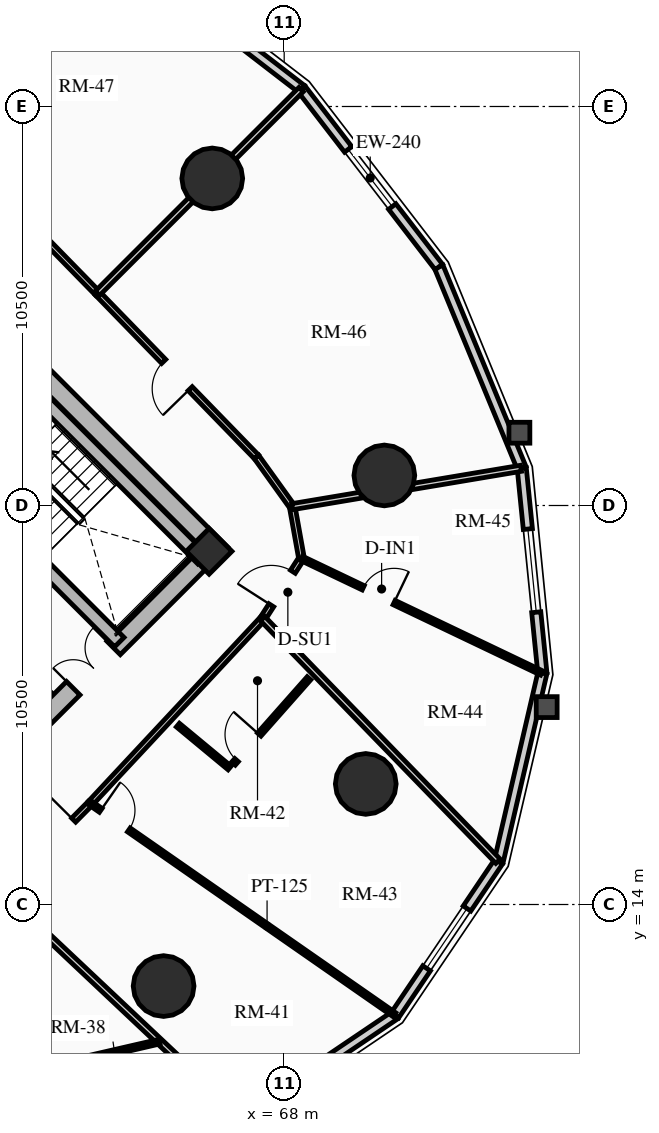
"""IFC4 building model, lengths in metres.
Left out: names, types, materials, properties, quantities, classifications, styles, units other than length and angle.
Written with IfcOpenShell. Run it as: python <this file> out.ifc"""

import sys

from ifc_helpers import new_model, si_unit, direction, frame, frame_2d, origin, origin_2d, place, context, subcontext, project, spatial, rectangle, circle, extrude, source, transform, mapped, element, fill, save


model = new_model("IFC4")
c1 = context("Model", 3, precision=1e-05, world=origin(), true_north=direction((0.0, 1.0)))
c2 = subcontext(c1, "Body", "Model", "MODEL_VIEW")
j1 = project(units=[si_unit("LENGTHUNIT", "METRE"), si_unit("PLANEANGLEUNIT", "RADIAN")], contexts=[c1])
p1 = place(None, origin())
s1 = spatial("IfcSite", under=j1, at=p1, CompositionType="ELEMENT")
p2 = place(p1, origin())
s2 = spatial("IfcBuilding", under=s1, at=p2, CompositionType="ELEMENT")
p3 = place(p2, frame((0.0, 0.0, 45.28)))
s3 = spatial("IfcBuildingStorey", under=s2, at=p3, CompositionType="ELEMENT", Elevation=45.28)
p4 = place(p3, frame((66.339, 23.227, 0.0), z_axis=(0.0, 0.0, 1.0), x_axis=(-0.707106781187, 0.707106781187, 0.0)))
e1 = element("IfcWall", 1, at=p4, inside=s3, PredefinedType="SHEAR", context=c2, shape_type="SweptSolid", body=[
    extrude(rectangle(XDim=14.3, YDim=0.5, at=frame_2d((7.15, 0.0))), origin(), (0.0, 0.0, 1.0), 2.91),
])
p5 = place(p3, frame((58.596, 15.838, 0.0), z_axis=(0.0, 0.0, 1.0), x_axis=(0.707106781187, 0.707106781187, 0.0)))
e2 = element("IfcWall", 2, at=p5, inside=s3, PredefinedType="SHEAR", context=c2, shape_type="SweptSolid", body=[
    extrude(rectangle(XDim=10.7, YDim=0.5, at=frame_2d((5.35, 0.0))), origin(), (0.0, 0.0, 1.0), 2.91),
])
m1 = source(origin(), c2, "Body", "SweptSolid", [
    extrude(rectangle(XDim=1.5, YDim=2.02, at=frame_2d((0.75, 1.01))), frame((0.0, 0.26, 0.0), z_axis=(0.0, -1.0, 0.0), x_axis=(1.0, 0.0, 0.0)), (0.0, 0.0, 1.0), 0.52),
])
p6 = place(p5, frame((5.45, 0.0, 0.0)))
e3 = element("IfcOpeningElement", 3, at=p6, cuts=e2, PredefinedType="OPENING", context=c2, shape_type="MappedRepresentation", body=[
    mapped(m1, transform((0.0, 0.0, 0.0), x_axis=(1.0, 0.0, 0.0), y_axis=(0.0, 1.0, 0.0), z_axis=(0.0, 0.0, 1.0), scale=1.0)),
])
p7 = place(p3, frame((63.662, 20.904, 0.0), z_axis=(0.0, 0.0, 1.0), x_axis=(-0.707106781187, 0.707106781187, 0.0)))
e4 = element("IfcWall", 4, at=p7, inside=s3, PredefinedType="SHEAR", context=c2, shape_type="SweptSolid", body=[
    extrude(rectangle(XDim=13.8, YDim=0.35, at=frame_2d((6.9, 0.0))), origin(), (0.0, 0.0, 1.0), 2.91),
])
m2 = source(origin(), c2, "Body", "SweptSolid", [
    extrude(rectangle(XDim=1.1, YDim=2.015, at=frame_2d((0.55, 1.007))), frame((0.0, 0.185, 0.0), z_axis=(0.0, -1.0, 0.0), x_axis=(1.0, 0.0, 0.0)), (0.0, 0.0, 1.0), 0.37),
])
p8 = place(p7, frame((10.025, 0.0, 0.0)))
e5 = element("IfcOpeningElement", 5, at=p8, cuts=e4, PredefinedType="OPENING", context=c2, shape_type="MappedRepresentation", body=[
    mapped(m2, transform((0.0, 0.0, 0.0), x_axis=(1.0, 0.0, 0.0), y_axis=(0.0, 1.0, 0.0), z_axis=(0.0, 0.0, 1.0), scale=1.0)),
])
p9 = place(p7, frame((12.025, 0.0, 0.0)))
e6 = element("IfcOpeningElement", 6, at=p9, cuts=e4, PredefinedType="OPENING", context=c2, shape_type="MappedRepresentation", body=[
    mapped(m2, transform((0.0, 0.0, 0.0), x_axis=(1.0, 0.0, 0.0), y_axis=(0.0, 1.0, 0.0), z_axis=(0.0, 0.0, 1.0), scale=1.0)),
])
m3 = source(origin(), c2, "Body", "SweptSolid", [
    extrude(rectangle(XDim=1.15, YDim=2.02, at=frame_2d((0.575, 1.01))), frame((0.0, 0.185, 0.0), z_axis=(0.0, -1.0, 0.0), x_axis=(1.0, 0.0, 0.0)), (0.0, 0.0, 1.0), 0.37),
])
p10 = place(p7, frame((5.33, 0.0, 0.0)))
e7 = element("IfcOpeningElement", 7, at=p10, cuts=e4, PredefinedType="OPENING", context=c2, shape_type="MappedRepresentation", body=[
    mapped(m3, transform((0.0, 0.0, 0.0), x_axis=(1.0, 0.0, 0.0), y_axis=(0.0, 1.0, 0.0), z_axis=(0.0, 0.0, 1.0), scale=1.0)),
])
p11 = place(p3, frame((65.847, 23.089, 0.0), z_axis=(0.0, 0.0, 1.0), x_axis=(-0.707106781187, 0.707106781187, 0.0)))
e8 = element("IfcWall", 8, at=p11, inside=s3, PredefinedType="SHEAR", context=c2, shape_type="SweptSolid", body=[
    extrude(rectangle(XDim=6.745, YDim=0.35, at=frame_2d((3.373, 0.0))), origin(), (0.0, 0.0, 1.0), 2.91),
])
p12 = place(p3, frame((66.024, 23.294, 0.0), z_axis=(0.0, 0.0, 1.0), x_axis=(0.707106781187, 0.707106781187, 0.0)))
e9 = element("IfcColumn", 9, at=p12, inside=s3, PredefinedType="COLUMN", context=c2, shape_type="SweptSolid", body=[
    extrude(rectangle(XDim=0.85, YDim=0.85, at=origin_2d()), origin(), (0.0, 0.0, 1.0), 2.91),
])
for number, where, z_axis, x_axis in (
    (10, (66.107, 33.107, 0.0), (0.0, 0.0, 1.0), (1.0, 0.0, 0.0)),
    (11, (64.827, 11.854, 0.0), (0.0, 0.0, 1.0), (1.0, 0.0, 0.0)),
    (12, (70.146, 17.173, 0.0), (0.0, 0.0, 1.0), (1.0, 0.0, 0.0)),
    (13, (70.635, 25.291, 0.0), (0.0, 0.0, 1.0), (1.0, 0.0, 0.0)),
):
    element("IfcColumn", number, at=place(p3, frame(where, z_axis=z_axis, x_axis=x_axis)), inside=s3, PredefinedType="USERDEFINED", context=c2, shape_type="SweptSolid", body=[
        extrude(circle(Radius=0.8, at=origin_2d()), origin(), (0.0, 0.0, 1.0), 2.91),
    ])
p13 = place(p3, frame((63.778, 39.068, 0.0), z_axis=(0.0, 0.0, 1.0), x_axis=(0.792020182601, -0.610494906082, 0.0)))
e14 = element("IfcWall", 14, at=p13, inside=s3, PredefinedType="SOLIDWALL", context=c2, shape_type="SweptSolid", body=[
    extrude(rectangle(XDim=5.911, YDim=0.24, at=frame_2d((2.956, 0.0))), origin(), (0.0, 0.0, 1.0), 2.073),
])
p14 = place(p3, frame((70.914, 11.086, 0.0), z_axis=(0.0, 0.0, 1.0), x_axis=(-0.828748297084, -0.559621532896, 0.0)))
e15 = element("IfcWall", 15, at=p14, inside=s3, PredefinedType="SOLIDWALL", context=c2, shape_type="SweptSolid", body=[
    extrude(rectangle(XDim=4.879, YDim=0.24, at=frame_2d((2.439, 0.0))), origin(), (0.0, 0.0, 1.0), 2.073),
])
p15 = place(p3, frame((73.644, 15.129, 0.0), z_axis=(0.0, 0.0, 1.0), x_axis=(-0.559621532896, -0.828748297084, 0.0)))
e16 = element("IfcWall", 16, at=p15, inside=s3, PredefinedType="SOLIDWALL", context=c2, shape_type="SweptSolid", body=[
    extrude(rectangle(XDim=4.879, YDim=0.24, at=frame_2d((2.439, 0.0))), origin(), (0.0, 0.0, 1.0), 2.073),
])
m4 = source(origin(), c2, "Body", "SweptSolid", [
    extrude(rectangle(XDim=1.9, YDim=1.35, at=frame_2d((0.95, 0.675))), frame((0.0, 0.13, 0.0), z_axis=(0.0, -1.0, 0.0), x_axis=(1.0, 0.0, 0.0)), (0.0, 0.0, 1.0), 0.26),
])
p16 = place(p15, frame((1.489, 0.0, 0.65)))
e17 = element("IfcOpeningElement", 17, at=p16, cuts=e16, PredefinedType="OPENING", context=c2, shape_type="MappedRepresentation", body=[
    mapped(m4, transform((0.0, 0.0, 0.0), x_axis=(1.0, 0.0, 0.0), y_axis=(0.0, 1.0, 0.0), z_axis=(0.0, 0.0, 1.0), scale=1.0)),
])
p17 = place(p3, frame((74.794, 20.09, 0.0), z_axis=(0.0, 0.0, 1.0), x_axis=(-0.22582585901, -0.974167686491, 0.0)))
e18 = element("IfcWall", 18, at=p17, inside=s3, PredefinedType="SOLIDWALL", context=c2, shape_type="SweptSolid", body=[
    extrude(rectangle(XDim=5.092, YDim=0.24, at=frame_2d((2.546, 0.0))), origin(), (0.0, 0.0, 1.0), 2.073),
])
p18 = place(p3, frame((74.251, 25.482, 0.0), z_axis=(0.0, 0.0, 1.0), x_axis=(0.100190592135, -0.994968263437, 0.0)))
e19 = element("IfcWall", 19, at=p18, inside=s3, PredefinedType="SOLIDWALL", context=c2, shape_type="SweptSolid", body=[
    extrude(rectangle(XDim=5.419, YDim=0.24, at=frame_2d((2.71, 0.0))), origin(), (0.0, 0.0, 1.0), 2.073),
])
m5 = source(origin(), c2, "Body", "SweptSolid", [
    extrude(rectangle(XDim=2.2, YDim=1.35, at=frame_2d((1.1, 0.675))), frame((0.0, 0.13, 0.0), z_axis=(0.0, -1.0, 0.0), x_axis=(1.0, 0.0, 0.0)), (0.0, 0.0, 1.0), 0.26),
])
p19 = place(p18, frame((1.61, 0.0, 0.65)))
e20 = element("IfcOpeningElement", 20, at=p19, cuts=e19, PredefinedType="OPENING", context=c2, shape_type="MappedRepresentation", body=[
    mapped(m5, transform((0.0, 0.0, 0.0), x_axis=(1.0, 0.0, 0.0), y_axis=(0.0, 1.0, 0.0), z_axis=(0.0, 0.0, 1.0), scale=1.0)),
])
p20 = place(p3, frame((72.068, 30.778, 0.0), z_axis=(0.0, 0.0, 1.0), x_axis=(0.381077764176, -0.924542988536, 0.0)))
e21 = element("IfcWall", 21, at=p20, inside=s3, PredefinedType="SOLIDWALL", context=c2, shape_type="SweptSolid", body=[
    extrude(rectangle(XDim=5.728, YDim=0.24, at=frame_2d((2.864, 0.0))), origin(), (0.0, 0.0, 1.0), 2.073),
])
p21 = place(p3, frame((68.459, 35.459, 0.0), z_axis=(0.0, 0.0, 1.0), x_axis=(0.610494906082, -0.792020182601, 0.0)))
e22 = element("IfcWall", 22, at=p21, inside=s3, PredefinedType="SOLIDWALL", context=c2, shape_type="SweptSolid", body=[
    extrude(rectangle(XDim=5.911, YDim=0.24, at=frame_2d((2.956, 0.0))), origin(), (0.0, 0.0, 1.0), 2.073),
])
p22 = place(p21, frame((2.005, 0.0, 0.65)))
e23 = element("IfcOpeningElement", 23, at=p22, cuts=e22, PredefinedType="OPENING", context=c2, shape_type="MappedRepresentation", body=[
    mapped(m4, transform((0.0, 0.0, 0.0), x_axis=(1.0, 0.0, 0.0), y_axis=(0.0, 1.0, 0.0), z_axis=(0.0, 0.0, 1.0), scale=1.0)),
])
p23 = place(p3, frame((63.086, 30.086, 0.0), z_axis=(0.0, 0.0, 1.0), x_axis=(-0.699075897379, 0.715047473741, 0.0)))
e24 = element("IfcWall", 24, at=p23, inside=s3, PredefinedType="PARTITIONING", context=c2, shape_type="SweptSolid", body=[
    extrude(rectangle(XDim=6.114, YDim=0.15, at=frame_2d((3.057, 0.0))), origin(), (0.0, 0.0, 1.0), 2.159),
])
p24 = place(p3, frame((60.562, 14.31, 0.0), z_axis=(0.0, 0.0, 1.0), x_axis=(0.704566236161, 0.709638230975, 0.0)))
e25 = element("IfcWall", 25, at=p24, inside=s3, PredefinedType="PARTITIONING", context=c2, shape_type="SweptSolid", body=[
    extrude(rectangle(XDim=3.321, YDim=0.15, at=frame_2d((1.661, 0.0))), origin(), (0.0, 0.0, 1.0), 2.159),
])
m6 = source(origin(), c2, "Body", "SweptSolid", [
    extrude(rectangle(XDim=1.05, YDim=2.015, at=frame_2d((0.525, 1.007))), frame((0.0, 0.085, 0.0), z_axis=(0.0, -1.0, 0.0), x_axis=(1.0, 0.0, 0.0)), (0.0, 0.0, 1.0), 0.17),
])
p25 = place(p24, frame((1.643, 0.0, 0.0)))
e26 = element("IfcOpeningElement", 26, at=p25, cuts=e25, PredefinedType="OPENING", context=c2, shape_type="MappedRepresentation", body=[
    mapped(m6, transform((0.0, 0.0, 0.0), x_axis=(1.0, 0.0, 0.0), y_axis=(0.0, 1.0, 0.0), z_axis=(0.0, 0.0, 1.0), scale=1.0)),
])
p26 = place(p3, frame((62.903, 16.667, 0.0), z_axis=(0.0, 0.0, 1.0), x_axis=(0.682371947497, 0.731005147225, 0.0)))
e27 = element("IfcWall", 27, at=p26, inside=s3, PredefinedType="PARTITIONING", context=c2, shape_type="SweptSolid", body=[
    extrude(rectangle(XDim=6.642, YDim=0.15, at=frame_2d((3.321, 0.0))), origin(), (0.0, 0.0, 1.0), 2.159),
])
p27 = place(p3, frame((67.435, 21.521, 0.0), z_axis=(0.0, 0.0, 1.0), x_axis=(0.540777197838, 0.841165870859, 0.0)))
e28 = element("IfcWall", 28, at=p27, inside=s3, PredefinedType="PARTITIONING", context=c2, shape_type="SweptSolid", body=[
    extrude(rectangle(XDim=1.888, YDim=0.15, at=frame_2d((0.944, 0.0))), origin(), (0.0, 0.0, 1.0), 2.205),
])
p28 = place(p27, frame((0.419, 0.0, 0.0)))
e29 = element("IfcOpeningElement", 29, at=p28, cuts=e28, PredefinedType="OPENING", context=c2, shape_type="MappedRepresentation", body=[
    mapped(m6, transform((0.0, 0.0, 0.0), x_axis=(1.0, 0.0, 0.0), y_axis=(0.0, 1.0, 0.0), z_axis=(0.0, 0.0, 1.0), scale=1.0)),
])
p29 = place(p3, frame((68.456, 23.11, 0.0), z_axis=(0.0, 0.0, 1.0), x_axis=(-0.1772522795, 0.984165448191, 0.0)))
e30 = element("IfcWall", 30, at=p29, inside=s3, PredefinedType="PARTITIONING", context=c2, shape_type="SweptSolid", body=[
    extrude(rectangle(XDim=1.382, YDim=0.15, at=frame_2d((0.691, 0.0))), origin(), (0.0, 0.0, 1.0), 2.159),
])
p30 = place(p3, frame((68.211, 24.469, 0.0), z_axis=(0.0, 0.0, 1.0), x_axis=(-0.583012141368, 0.812463441034, 0.0)))
e31 = element("IfcWall", 31, at=p30, inside=s3, PredefinedType="PARTITIONING", context=c2, shape_type="SweptSolid", body=[
    extrude(rectangle(XDim=1.613, YDim=0.15, at=frame_2d((0.807, 0.0))), origin(), (0.0, 0.0, 1.0), 2.205),
])
p31 = place(p3, frame((67.27, 25.78, 0.0), z_axis=(0.0, 0.0, 1.0), x_axis=(-0.696847842907, 0.717218992942, 0.0)))
e32 = element("IfcWall", 32, at=p31, inside=s3, PredefinedType="PARTITIONING", context=c2, shape_type="SweptSolid", body=[
    extrude(rectangle(XDim=6.004, YDim=0.15, at=frame_2d((3.002, 0.0))), origin(), (0.0, 0.0, 1.0), 2.635),
])
m7 = source(origin(), c2, "Body", "SweptSolid", [
    extrude(rectangle(XDim=1.0, YDim=2.015, at=frame_2d((0.5, 1.007))), frame((0.0, 0.085, 0.0), z_axis=(0.0, -1.0, 0.0), x_axis=(1.0, 0.0, 0.0)), (0.0, 0.0, 1.0), 0.17),
])
p32 = place(p31, frame((2.502, 0.0, 0.0)))
e33 = element("IfcOpeningElement", 33, at=p32, cuts=e32, PredefinedType="OPENING", context=c2, shape_type="MappedRepresentation", body=[
    mapped(m7, transform((0.0, 0.0, 0.0), x_axis=(1.0, 0.0, 0.0), y_axis=(0.0, 1.0, 0.0), z_axis=(0.0, 0.0, 1.0), scale=1.0)),
])
p33 = place(p3, frame((63.086, 30.086, 0.0), z_axis=(0.0, 0.0, 1.0), x_axis=(0.707106781187, 0.707106781187, 0.0)))
e34 = element("IfcWall", 34, at=p33, inside=s3, PredefinedType="PARTITIONING", context=c2, shape_type="SweptSolid", body=[
    extrude(rectangle(XDim=7.579, YDim=0.16, at=frame_2d((3.79, 0.0))), origin(), (0.0, 0.0, 1.0), 2.073),
])
p34 = place(p3, frame((60.562, 14.31, 0.0), z_axis=(0.0, 0.0, 1.0), x_axis=(0.727781661561, -0.685808904211, 0.0)))
e35 = element("IfcWall", 35, at=p34, inside=s3, PredefinedType="PARTITIONING", context=c2, shape_type="SweptSolid", body=[
    extrude(rectangle(XDim=8.655, YDim=0.16, at=frame_2d((4.328, 0.0))), origin(), (0.0, 0.0, 1.0), 2.073),
])
p35 = place(p3, frame((67.435, 21.521, 0.0), z_axis=(0.0, 0.0, 1.0), x_axis=(0.6962628802, -0.717786877601, 0.0)))
e36 = element("IfcWall", 36, at=p35, inside=s3, PredefinedType="PARTITIONING", context=c2, shape_type="SweptSolid", body=[
    extrude(rectangle(XDim=8.893, YDim=0.16, at=frame_2d((4.446, 0.0))), origin(), (0.0, 0.0, 1.0), 2.073),
])
p36 = place(p3, frame((68.211, 24.469, 0.0), z_axis=(0.0, 0.0, 1.0), x_axis=(0.986231309699, 0.165371713934, 0.0)))
e37 = element("IfcWall", 37, at=p36, inside=s3, PredefinedType="PARTITIONING", context=c2, shape_type="SweptSolid", body=[
    extrude(rectangle(XDim=6.104, YDim=0.16, at=frame_2d((3.052, 0.0))), origin(), (0.0, 0.0, 1.0), 2.073),
])
p37 = place(p3, frame((60.921, 9.517, 0.0), z_axis=(0.0, 0.0, 1.0), x_axis=(0.974453436038, 0.224589627973, 0.0)))
e38 = element("IfcWall", 38, at=p37, inside=s3, PredefinedType="PARTITIONING", context=c2, shape_type="SweptSolid", body=[
    extrude(rectangle(XDim=3.898, YDim=0.125, at=frame_2d((1.949, 0.0))), origin(), (0.0, 0.0, 1.0), 2.205),
])
p38 = place(p3, frame((62.903, 16.667, 0.0), z_axis=(0.0, 0.0, 1.0), x_axis=(0.820761665638, -0.571270766116, 0.0)))
e39 = element("IfcWall", 39, at=p38, inside=s3, PredefinedType="PARTITIONING", context=c2, shape_type="SweptSolid", body=[
    extrude(rectangle(XDim=9.743, YDim=0.125, at=frame_2d((4.872, 0.0))), origin(), (0.0, 0.0, 1.0), 2.073),
])
m8 = source(origin(), c2, "Body", "SweptSolid", [
    extrude(rectangle(XDim=0.9, YDim=2.005, at=frame_2d((0.45, 1.002))), frame((0.0, 0.073, 0.0), z_axis=(0.0, -1.0, 0.0), x_axis=(1.0, 0.0, 0.0)), (0.0, 0.0, 1.0), 0.145),
])
p39 = place(p38, frame((0.33, 0.0, 0.0)))
e40 = element("IfcOpeningElement", 40, at=p39, cuts=e39, PredefinedType="OPENING", context=c2, shape_type="MappedRepresentation", body=[
    mapped(m8, transform((0.0, 0.0, 0.0), x_axis=(1.0, 0.0, 0.0), y_axis=(0.0, 1.0, 0.0), z_axis=(0.0, 0.0, 1.0), scale=1.0)),
])
p40 = place(p3, frame((65.202, 18.721, 0.0), z_axis=(0.0, 0.0, 1.0), x_axis=(0.769814202386, -0.638268042287, 0.0)))
e41 = element("IfcWall", 41, at=p40, inside=s3, PredefinedType="PARTITIONING", context=c2, shape_type="SweptSolid", body=[
    extrude(rectangle(XDim=1.769, YDim=0.125, at=frame_2d((0.884, 0.0))), origin(), (0.0, 0.0, 1.0), 2.635),
])
p41 = place(p3, frame((66.667, 17.709, 0.0), z_axis=(0.0, 0.0, 1.0), x_axis=(0.662510581678, 0.749052554341, 0.0)))
e42 = element("IfcWall", 42, at=p41, inside=s3, PredefinedType="PARTITIONING", context=c2, shape_type="SweptSolid", body=[
    extrude(rectangle(XDim=2.996, YDim=0.125, at=frame_2d((1.498, 0.0))), origin(), (0.0, 0.0, 1.0), 2.159),
])
p42 = place(p41, frame((0.12, 0.0, 0.0)))
e43 = element("IfcOpeningElement", 43, at=p42, cuts=e42, PredefinedType="OPENING", context=c2, shape_type="MappedRepresentation", body=[
    mapped(m8, transform((0.0, 0.0, 0.0), x_axis=(1.0, 0.0, 0.0), y_axis=(0.0, 1.0, 0.0), z_axis=(0.0, 0.0, 1.0), scale=1.0)),
])
p43 = place(p3, frame((68.456, 23.11, 0.0), z_axis=(0.0, 0.0, 1.0), x_axis=(0.902430819297, -0.430834790125, 0.0)))
e44 = element("IfcWall", 44, at=p43, inside=s3, PredefinedType="PARTITIONING", context=c2, shape_type="SweptSolid", body=[
    extrude(rectangle(XDim=7.002, YDim=0.125, at=frame_2d((3.501, 0.0))), origin(), (0.0, 0.0, 1.0), 2.073),
])
p44 = place(p43, frame((1.8, 0.0, 0.0)))
e45 = element("IfcOpeningElement", 45, at=p44, cuts=e44, PredefinedType="OPENING", context=c2, shape_type="MappedRepresentation", body=[
    mapped(m8, transform((0.0, 0.0, 0.0), x_axis=(1.0, 0.0, 0.0), y_axis=(0.0, 1.0, 0.0), z_axis=(0.0, 0.0, 1.0), scale=1.0)),
])
m9 = source(origin(), c2, "Body", "SweptSolid", [
    extrude(rectangle(XDim=1.9, YDim=1.35, at=frame_2d((0.95, 0.675))), frame((0.0, 0.03, 0.0), z_axis=(0.0, -1.0, 0.0), x_axis=(1.0, 0.0, 0.0)), (0.0, 0.0, 1.0), 0.06),
])
p45 = place(p16, origin())
e46 = element("IfcWindow", 46, at=p45, inside=s3, PartitioningType="DOUBLE_PANEL_VERTICAL", PredefinedType="WINDOW", context=c2, shape_type="MappedRepresentation", body=[
    mapped(m9, transform((0.0, 0.0, 0.0), x_axis=(1.0, 0.0, 0.0), y_axis=(0.0, 1.0, 0.0), z_axis=(0.0, 0.0, 1.0), scale=1.0)),
])
fill(e17, e46)
m10 = source(origin(), c2, "Body", "SweptSolid", [
    extrude(rectangle(XDim=2.2, YDim=1.35, at=frame_2d((1.1, 0.675))), frame((0.0, 0.03, 0.0), z_axis=(0.0, -1.0, 0.0), x_axis=(1.0, 0.0, 0.0)), (0.0, 0.0, 1.0), 0.06),
])
p46 = place(p19, origin())
e47 = element("IfcWindow", 47, at=p46, inside=s3, PartitioningType="DOUBLE_PANEL_VERTICAL", PredefinedType="WINDOW", context=c2, shape_type="MappedRepresentation", body=[
    mapped(m10, transform((0.0, 0.0, 0.0), x_axis=(1.0, 0.0, 0.0), y_axis=(0.0, 1.0, 0.0), z_axis=(0.0, 0.0, 1.0), scale=1.0)),
])
fill(e20, e47)
p47 = place(p22, origin())
e48 = element("IfcWindow", 48, at=p47, inside=s3, PartitioningType="DOUBLE_PANEL_VERTICAL", PredefinedType="WINDOW", context=c2, shape_type="MappedRepresentation", body=[
    mapped(m9, transform((0.0, 0.0, 0.0), x_axis=(1.0, 0.0, 0.0), y_axis=(0.0, 1.0, 0.0), z_axis=(0.0, 0.0, 1.0), scale=1.0)),
])
fill(e23, e48)
m11 = source(origin(), c2, "Body", "SweptSolid", [
    extrude(rectangle(XDim=1.5, YDim=2.02, at=frame_2d((0.75, 1.01))), frame((0.0, 0.025, 0.0), z_axis=(0.0, -1.0, 0.0), x_axis=(1.0, 0.0, 0.0)), (0.0, 0.0, 1.0), 0.05),
])
p48 = place(p6, origin())
e49 = element("IfcDoor", 49, at=p48, inside=s3, OperationType="DOUBLE_DOOR_SINGLE_SWING", PredefinedType="DOOR", context=c2, shape_type="MappedRepresentation", body=[
    mapped(m11, transform((0.0, 0.0, 0.0), x_axis=(1.0, 0.0, 0.0), y_axis=(0.0, 1.0, 0.0), z_axis=(0.0, 0.0, 1.0), scale=1.0)),
])
fill(e3, e49)
m12 = source(origin(), c2, "Body", "SweptSolid", [
    extrude(rectangle(XDim=1.05, YDim=2.015, at=frame_2d((0.525, 1.007))), frame((0.0, 0.025, 0.0), z_axis=(0.0, -1.0, 0.0), x_axis=(1.0, 0.0, 0.0)), (0.0, 0.0, 1.0), 0.05),
])
p49 = place(p25, origin())
e50 = element("IfcDoor", 50, at=p49, inside=s3, OperationType="SINGLE_SWING_RIGHT", PredefinedType="DOOR", context=c2, shape_type="MappedRepresentation", body=[
    mapped(m12, transform((0.0, 0.0, 0.0), x_axis=(1.0, 0.0, 0.0), y_axis=(0.0, 1.0, 0.0), z_axis=(0.0, 0.0, 1.0), scale=1.0)),
])
fill(e26, e50)
m13 = source(origin(), c2, "Body", "SweptSolid", [
    extrude(rectangle(XDim=0.9, YDim=2.005, at=frame_2d((0.45, 1.002))), frame((0.0, 0.025, 0.0), z_axis=(0.0, -1.0, 0.0), x_axis=(1.0, 0.0, 0.0)), (0.0, 0.0, 1.0), 0.05),
])
p50 = place(p39, origin())
e51 = element("IfcDoor", 51, at=p50, inside=s3, OperationType="SINGLE_SWING_LEFT", PredefinedType="DOOR", context=c2, shape_type="MappedRepresentation", body=[
    mapped(m13, transform((0.0, 0.0, 0.0), x_axis=(1.0, 0.0, 0.0), y_axis=(0.0, 1.0, 0.0), z_axis=(0.0, 0.0, 1.0), scale=1.0)),
])
fill(e40, e51)
p51 = place(p42, origin())
e52 = element("IfcDoor", 52, at=p51, inside=s3, OperationType="SINGLE_SWING_RIGHT", PredefinedType="DOOR", context=c2, shape_type="MappedRepresentation", body=[
    mapped(m13, transform((0.0, 0.0, 0.0), x_axis=(1.0, 0.0, 0.0), y_axis=(0.0, 1.0, 0.0), z_axis=(0.0, 0.0, 1.0), scale=1.0)),
])
fill(e43, e52)
p52 = place(p28, origin())
e53 = element("IfcDoor", 53, at=p52, inside=s3, OperationType="SINGLE_SWING_LEFT", PredefinedType="DOOR", context=c2, shape_type="MappedRepresentation", body=[
    mapped(m12, transform((0.0, 0.0, 0.0), x_axis=(1.0, 0.0, 0.0), y_axis=(0.0, 1.0, 0.0), z_axis=(0.0, 0.0, 1.0), scale=1.0)),
])
fill(e29, e53)
p53 = place(p44, origin())
e54 = element("IfcDoor", 54, at=p53, inside=s3, OperationType="SINGLE_SWING_RIGHT", PredefinedType="DOOR", context=c2, shape_type="MappedRepresentation", body=[
    mapped(m13, transform((0.0, 0.0, 0.0), x_axis=(1.0, 0.0, 0.0), y_axis=(0.0, 1.0, 0.0), z_axis=(0.0, 0.0, 1.0), scale=1.0)),
])
fill(e45, e54)
m14 = source(origin(), c2, "Body", "SweptSolid", [
    extrude(rectangle(XDim=1.0, YDim=2.015, at=frame_2d((0.5, 1.007))), frame((0.0, 0.025, 0.0), z_axis=(0.0, -1.0, 0.0), x_axis=(1.0, 0.0, 0.0)), (0.0, 0.0, 1.0), 0.05),
])
p54 = place(p32, origin())
e55 = element("IfcDoor", 55, at=p54, inside=s3, OperationType="SINGLE_SWING_LEFT", PredefinedType="DOOR", context=c2, shape_type="MappedRepresentation", body=[
    mapped(m14, transform((0.0, 0.0, 0.0), x_axis=(1.0, 0.0, 0.0), y_axis=(0.0, 1.0, 0.0), z_axis=(0.0, 0.0, 1.0), scale=1.0)),
])
fill(e33, e55)
save(model, sys.argv[1])
